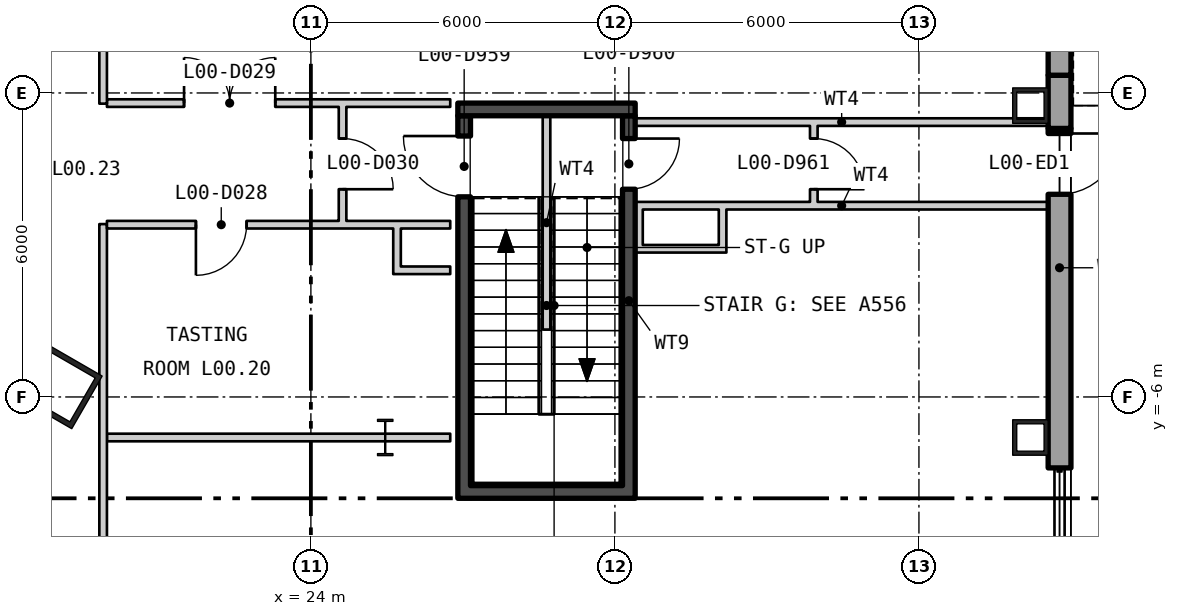
"""IFC4 building model, lengths in metres.
Left out: names, types, materials, properties, quantities, classifications, styles, units other than length and angle.
Written with IfcOpenShell. Run it as: python <this file> out.ifc"""

import sys

from ifc_helpers import new_model, si_unit, direction, frame, frame_2d, origin, origin_2d, place, context, subcontext, project, spatial, polyline, rectangle, hollow_rectangle, i_section, outline, extrude, element, fill, save


model = new_model("IFC4")
c1 = context("Model", 3, precision=1e-05, world=origin(), true_north=direction((0.0, 1.0)))
c2 = subcontext(c1, "Body", "Model", "MODEL_VIEW")
j1 = project(units=[si_unit("LENGTHUNIT", "METRE"), si_unit("PLANEANGLEUNIT", "RADIAN")], contexts=[c1])
p1 = place(None, origin())
s1 = spatial("IfcSite", under=j1, at=p1, CompositionType="ELEMENT")
p2 = place(p1, origin())
s2 = spatial("IfcBuilding", under=s1, at=p2, CompositionType="ELEMENT")
p3 = place(p2, origin())
s3 = spatial("IfcBuildingStorey", under=s2, at=p3, CompositionType="ELEMENT", Elevation=0.0)
p4 = place(p3, frame((19.061, -5.807, 0.0), z_axis=(0.0, 0.0, 1.0), x_axis=(0.5, 0.866025403784, 0.0)))
e1 = element("IfcColumn", 1, at=p4, inside=s3, PredefinedType="COLUMN", context=c2, shape_type="SweptSolid", body=[
    extrude(hollow_rectangle(XDim=1.2, YDim=1.2, WallThickness=0.1, at=origin_2d()), origin(), (0.0, 0.0, 1.0), 8.4),
])
for number, where, z_axis, x_axis in (
    (2, (38.2, -6.8, 0.0), (0.0, 0.0, 1.0), (0.0, 1.0, 0.0)),
    (3, (38.2, -0.25, 0.0), (0.0, 0.0, 1.0), (0.0, 1.0, 0.0)),
):
    element("IfcColumn", number, at=place(p3, frame(where, z_axis=z_axis, x_axis=x_axis)), inside=s3, PredefinedType="COLUMN", context=c2, shape_type="SweptSolid", body=[
        extrude(hollow_rectangle(XDim=0.7, YDim=0.7, WallThickness=0.08, at=origin_2d()), origin(), (0.0, 0.0, 1.0), 8.4),
    ])
p5 = place(p3, frame((25.467, -6.8, 0.0), z_axis=(0.0, 0.0, 1.0), x_axis=(1.0, 0.0, 0.0)))
e4 = element("IfcColumn", 4, at=p5, inside=s3, PredefinedType="COLUMN", context=c2, shape_type="SweptSolid", body=[
    extrude(i_section(OverallWidth=0.304, OverallDepth=0.716, WebThickness=0.021, FlangeThickness=0.04, at=origin_2d()), origin(), (0.0, 0.0, 1.0), 8.4),
])
p6 = place(p3, frame((38.775, -33.575, 5.4), z_axis=(0.0, 0.0, 1.0), x_axis=(0.0, 1.0, 0.0)))
e5 = element("IfcWall", 5, at=p6, inside=s3, PredefinedType="SOLIDWALL", context=c2, shape_type="SweptSolid", body=[
    extrude(outline(polyline([(-0.225, -0.225), (53.775, -0.225), (53.325, 0.225), (0.225, 0.225), (-0.225, -0.225)])), origin(), (0.0, 0.0, 1.0), 2.6),
])
p7 = place(p3, frame((38.775, -7.4, -0.4), z_axis=(0.0, 0.0, 1.0), x_axis=(0.0, 1.0, 0.0)))
e6 = element("IfcWall", 6, at=p7, inside=s3, PredefinedType="SOLIDWALL", context=c2, shape_type="SweptSolid", body=[
    extrude(outline(polyline([(0.0, -0.225), (1.2, -0.225), (1.2, 0.225), (0.0, 0.225), (0.0, -0.225)])), origin(), (0.0, 0.0, 1.0), 5.8),
])
p8 = place(p3, frame((38.775, -0.7, -0.4), z_axis=(0.0, 0.0, 1.0), x_axis=(0.0, 1.0, 0.0)))
e7 = element("IfcWall", 7, at=p8, inside=s3, PredefinedType="SOLIDWALL", context=c2, shape_type="SweptSolid", body=[
    extrude(outline(polyline([(0.0, -0.225), (1.05, -0.225), (1.05, 0.225), (0.0, 0.225), (0.0, -0.225)])), origin(), (0.0, 0.0, 1.0), 5.51),
])
p9 = place(p3, frame((38.775, -12.75, -0.4), z_axis=(0.0, 0.0, 1.0), x_axis=(0.0, 1.0, 0.0)))
e8 = element("IfcWall", 8, at=p9, inside=s3, PredefinedType="SOLIDWALL", context=c2, shape_type="SweptSolid", body=[
    extrude(outline(polyline([(0.0, -0.225), (5.35, -0.225), (5.35, 0.225), (0.0, 0.225), (0.0, -0.225)])), origin(), (0.0, 0.0, 1.0), 1.0),
])
p10 = place(p3, frame((38.775, -6.2, -0.4), z_axis=(0.0, 0.0, 1.0), x_axis=(0.0, 1.0, 0.0)))
e9 = element("IfcWall", 9, at=p10, inside=s3, PredefinedType="SOLIDWALL", context=c2, shape_type="SweptSolid", body=[
    extrude(outline(polyline([(0.0, -0.225), (5.5, -0.225), (5.5, 0.225), (0.0, 0.225), (0.0, -0.225)])), origin(), (0.0, 0.0, 1.0), 5.8),
])
p11 = place(p10, frame((4.2, 0.0, 0.4)))
e10 = element("IfcOpeningElement", 10, at=p11, cuts=e9, PredefinedType="OPENING", context=c2, shape_type="SweptSolid", body=[
    extrude(rectangle(XDim=1.2, YDim=2.4, at=frame_2d((0.6, 1.2))), frame((0.0, 0.235, 0.0), z_axis=(0.0, -1.0, 0.0), x_axis=(1.0, 0.0, 0.0)), (0.0, 0.0, 1.0), 0.47),
])
p12 = place(p3, frame((38.775, 0.35, -0.4), z_axis=(0.0, 0.0, 1.0), x_axis=(0.0, 1.0, 0.0)))
e11 = element("IfcWall", 11, at=p12, inside=s3, PredefinedType="SOLIDWALL", context=c2, shape_type="SweptSolid", body=[
    extrude(outline(polyline([(0.0, -0.225), (5.35, -0.225), (5.35, 0.225), (0.0, 0.225), (0.0, -0.225)])), origin(), (0.0, 0.0, 1.0), 5.8),
])
p13 = place(p12, frame((0.965, 0.0, 0.4)))
e12 = element("IfcOpeningElement", 12, at=p13, cuts=e11, PredefinedType="OPENING", context=c2, shape_type="SweptSolid", body=[
    extrude(rectangle(XDim=1.65, YDim=3.0, at=frame_2d((0.825, 1.5))), frame((0.0, 0.235, 0.0), z_axis=(0.0, -1.0, 0.0), x_axis=(1.0, 0.0, 0.0)), (0.0, 0.0, 1.0), 0.47),
])
p14 = place(p12, frame((2.735, 0.0, 0.4)))
e13 = element("IfcOpeningElement", 13, at=p14, cuts=e11, PredefinedType="OPENING", context=c2, shape_type="SweptSolid", body=[
    extrude(rectangle(XDim=1.65, YDim=3.0, at=frame_2d((0.825, 1.5))), frame((0.0, 0.235, 0.0), z_axis=(0.0, -1.0, 0.0), x_axis=(1.0, 0.0, 0.0)), (0.0, 0.0, 1.0), 0.47),
])
p15 = place(p3, frame((27.025, -7.75, 0.0), z_axis=(0.0, 0.0, 1.0), x_axis=(0.0, 1.0, 0.0)))
e14 = element("IfcWall", 14, at=p15, inside=s3, PredefinedType="SHEAR", context=c2, shape_type="SweptSolid", body=[
    extrude(rectangle(XDim=7.3, YDim=0.25, at=frame_2d((3.65, 0.0))), origin(), (0.0, 0.0, 1.0), 8.18),
])
p16 = place(p15, frame((5.7, 0.0, 0.0)))
e15 = element("IfcOpeningElement", 15, at=p16, cuts=e14, PredefinedType="OPENING", context=c2, shape_type="SweptSolid", body=[
    extrude(rectangle(XDim=1.2, YDim=2.1, at=frame_2d((0.6, 1.05))), frame((0.0, 0.135, 0.0), z_axis=(0.0, -1.0, 0.0), x_axis=(1.0, 0.0, 0.0)), (0.0, 0.0, 1.0), 0.27),
])
p17 = place(p3, frame((30.275, -7.75, 0.0), z_axis=(0.0, 0.0, 1.0), x_axis=(0.0, 1.0, 0.0)))
e16 = element("IfcWall", 16, at=p17, inside=s3, PredefinedType="SHEAR", context=c2, shape_type="SweptSolid", body=[
    extrude(rectangle(XDim=7.3, YDim=0.25, at=frame_2d((3.65, 0.0))), origin(), (0.0, 0.0, 1.0), 8.18),
])
p18 = place(p17, frame((5.85, 0.0, 0.0)))
e17 = element("IfcOpeningElement", 17, at=p18, cuts=e16, PredefinedType="OPENING", context=c2, shape_type="SweptSolid", body=[
    extrude(rectangle(XDim=1.0, YDim=2.1, at=frame_2d((0.5, 1.05))), frame((0.0, 0.135, 0.0), z_axis=(0.0, -1.0, 0.0), x_axis=(1.0, 0.0, 0.0)), (0.0, 0.0, 1.0), 0.27),
])
for number, where, z_axis, x_axis in (
    (18, (26.9, -7.875, 0.0), (0.0, 0.0, 1.0), (1.0, 0.0, 0.0)),
    (19, (26.9, -0.325, 0.0), (0.0, 0.0, 1.0), (1.0, 0.0, 0.0)),
):
    element("IfcWall", number, at=place(p3, frame(where, z_axis=z_axis, x_axis=x_axis)), inside=s3, PredefinedType="SHEAR", context=c2, shape_type="SweptSolid", body=[
        extrude(rectangle(XDim=3.5, YDim=0.25, at=frame_2d((1.75, 0.0))), origin(), (0.0, 0.0, 1.0), 8.18),
    ])
p19 = place(p3, frame((28.65, -4.67, 0.0), z_axis=(0.0, 0.0, 1.0), x_axis=(0.0, 1.0, 0.0)))
e20 = element("IfcWall", 20, at=p19, inside=s3, PredefinedType="PARTITIONING", context=c2, shape_type="SweptSolid", body=[
    extrude(rectangle(XDim=4.22, YDim=0.15, at=frame_2d((2.11, 0.0))), origin(), (0.0, 0.0, 1.0), 4.0),
])
for number, where, z_axis, x_axis in (
    (21, (38.55, -2.225, 0.0), (0.0, 0.0, 1.0), (-1.0, 0.0, 0.0)),
    (22, (38.55, -0.575, 0.0), (0.0, 0.0, 1.0), (-1.0, 0.0, 0.0)),
):
    element("IfcWall", number, at=place(p3, frame(where, z_axis=z_axis, x_axis=x_axis)), inside=s3, PredefinedType="PARTITIONING", context=c2, shape_type="SweptSolid", body=[
        extrude(rectangle(XDim=8.15, YDim=0.15, at=frame_2d((4.075, 0.0))), origin(), (0.0, 0.0, 1.0), 8.18),
    ])
p20 = place(p3, frame((33.925, -2.15, 0.0), z_axis=(0.0, 0.0, 1.0), x_axis=(0.0, 1.0, 0.0)))
e23 = element("IfcWall", 23, at=p20, inside=s3, PredefinedType="PARTITIONING", context=c2, shape_type="SweptSolid", body=[
    extrude(rectangle(XDim=1.5, YDim=0.15, at=frame_2d((0.75, 0.0))), origin(), (0.0, 0.0, 1.0), 8.18),
])
p21 = place(p20, frame((0.25, 0.0, 0.0)))
e24 = element("IfcOpeningElement", 24, at=p21, cuts=e23, PredefinedType="OPENING", context=c2, shape_type="SweptSolid", body=[
    extrude(rectangle(XDim=1.0, YDim=2.1, at=frame_2d((0.5, 1.05))), frame((0.0, 0.085, 0.0), z_axis=(0.0, -1.0, 0.0), x_axis=(1.0, 0.0, 0.0)), (0.0, 0.0, 1.0), 0.17),
])
p22 = place(p3, frame((30.4, -3.075, 0.0), z_axis=(0.0, 0.0, 1.0), x_axis=(1.0, 0.0, 0.0)))
e25 = element("IfcWall", 25, at=p22, inside=s3, PredefinedType="PARTITIONING", context=c2, shape_type="SweptSolid", body=[
    extrude(rectangle(XDim=1.8, YDim=0.15, at=frame_2d((0.9, 0.0))), origin(), (0.0, 0.0, 1.0), 8.18),
])
for number, where, z_axis, x_axis in (
    (26, (30.475, -3.0, 0.0), (0.0, 0.0, 1.0), (0.0, 1.0, 0.0)),
    (27, (32.125, -3.0, 0.0), (0.0, 0.0, 1.0), (0.0, 1.0, 0.0)),
):
    element("IfcWall", number, at=place(p3, frame(where, z_axis=z_axis, x_axis=x_axis)), inside=s3, PredefinedType="PARTITIONING", context=c2, shape_type="SweptSolid", body=[
        extrude(rectangle(XDim=0.7, YDim=0.15, at=frame_2d((0.35, 0.0))), origin(), (0.0, 0.0, 1.0), 8.18),
    ])
p23 = place(p3, frame((19.9, -23.6, 0.0), z_axis=(0.0, 0.0, 1.0), x_axis=(0.0, 1.0, 0.0)))
e28 = element("IfcWall", 28, at=p23, inside=s3, PredefinedType="PARTITIONING", context=c2, shape_type="SweptSolid", body=[
    extrude(rectangle(XDim=21.012, YDim=0.15, at=frame_2d((10.506, 0.0))), origin(), (0.0, 0.0, 1.0), 8.18),
])
p24 = place(p23, frame((2.518, 0.0, 0.0)))
e29 = element("IfcOpeningElement", 29, at=p24, cuts=e28, PredefinedType="OPENING", context=c2, shape_type="SweptSolid", body=[
    extrude(rectangle(XDim=1.8, YDim=2.1, at=frame_2d((0.9, 1.05))), frame((0.0, 0.085, 0.0), z_axis=(0.0, -1.0, 0.0), x_axis=(1.0, 0.0, 0.0)), (0.0, 0.0, 1.0), 0.17),
])
p25 = place(p23, frame((11.823, 0.0, 0.0)))
e30 = element("IfcOpeningElement", 30, at=p25, cuts=e28, PredefinedType="OPENING", context=c2, shape_type="SweptSolid", body=[
    extrude(rectangle(XDim=1.8, YDim=2.1, at=frame_2d((0.9, 1.05))), frame((0.0, 0.085, 0.0), z_axis=(0.0, -1.0, 0.0), x_axis=(1.0, 0.0, 0.0)), (0.0, 0.0, 1.0), 0.17),
])
p26 = place(p3, frame((19.9, -0.211, 0.0), z_axis=(0.0, 0.0, 1.0), x_axis=(0.0, 1.0, 0.0)))
e31 = element("IfcWall", 31, at=p26, inside=s3, PredefinedType="PARTITIONING", context=c2, shape_type="SweptSolid", body=[
    extrude(rectangle(XDim=20.171, YDim=0.15, at=frame_2d((10.085, 0.0))), origin(), (0.0, 0.0, 1.0), 8.18),
])
p27 = place(p26, frame((9.711, 0.0, 0.0)))
e32 = element("IfcOpeningElement", 32, at=p27, cuts=e31, PredefinedType="OPENING", context=c2, shape_type="SweptSolid", body=[
    extrude(rectangle(XDim=1.0, YDim=2.1, at=frame_2d((0.5, 1.05))), frame((0.0, 0.085, 0.0), z_axis=(0.0, -1.0, 0.0), x_axis=(1.0, 0.0, 0.0)), (0.0, 0.0, 1.0), 0.17),
])
p28 = place(p3, frame((19.975, -6.8, 0.0), z_axis=(0.0, 0.0, 1.0), x_axis=(1.0, 0.0, 0.0)))
e33 = element("IfcWall", 33, at=p28, inside=s3, PredefinedType="PARTITIONING", context=c2, shape_type="SweptSolid", body=[
    extrude(rectangle(XDim=6.775, YDim=0.15, at=frame_2d((3.388, 0.0))), origin(), (0.0, 0.0, 1.0), 7.39),
])
p29 = place(p3, frame((19.975, -2.6, 0.0), z_axis=(0.0, 0.0, 1.0), x_axis=(1.0, 0.0, 0.0)))
e34 = element("IfcWall", 34, at=p29, inside=s3, PredefinedType="PARTITIONING", context=c2, shape_type="SweptSolid", body=[
    extrude(rectangle(XDim=5.713, YDim=0.15, at=frame_2d((2.857, 0.0))), origin(), (0.0, 0.0, 1.0), 8.18),
])
p30 = place(p29, frame((1.756, 0.0, 0.0)))
e35 = element("IfcOpeningElement", 35, at=p30, cuts=e34, PredefinedType="OPENING", context=c2, shape_type="SweptSolid", body=[
    extrude(rectangle(XDim=1.0, YDim=2.1, at=frame_2d((0.5, 1.05))), frame((0.0, 0.085, 0.0), z_axis=(0.0, -1.0, 0.0), x_axis=(1.0, 0.0, 0.0)), (0.0, 0.0, 1.0), 0.17),
])
p31 = place(p3, frame((19.975, -0.2, 0.0), z_axis=(0.0, 0.0, 1.0), x_axis=(1.0, 0.0, 0.0)))
e36 = element("IfcWall", 36, at=p31, inside=s3, PredefinedType="PARTITIONING", context=c2, shape_type="SweptSolid", body=[
    extrude(rectangle(XDim=6.775, YDim=0.15, at=frame_2d((3.388, 0.0))), origin(), (0.0, 0.0, 1.0), 8.18),
])
p32 = place(p31, frame((1.522, 0.0, 0.0)))
e37 = element("IfcOpeningElement", 37, at=p32, cuts=e36, PredefinedType="OPENING", context=c2, shape_type="SweptSolid", body=[
    extrude(rectangle(XDim=1.8, YDim=2.1, at=frame_2d((0.9, 1.05))), frame((0.0, 0.085, 0.0), z_axis=(0.0, -1.0, 0.0), x_axis=(1.0, 0.0, 0.0)), (0.0, 0.0, 1.0), 0.17),
])
p33 = place(p3, frame((24.625, -2.525, 0.0), z_axis=(0.0, 0.0, 1.0), x_axis=(0.0, 1.0, 0.0)))
e38 = element("IfcWall", 38, at=p33, inside=s3, PredefinedType="PARTITIONING", context=c2, shape_type="SweptSolid", body=[
    extrude(rectangle(XDim=2.25, YDim=0.15, at=frame_2d((1.125, 0.0))), origin(), (0.0, 0.0, 1.0), 8.18),
])
p34 = place(p33, frame((0.625, 0.0, 0.0)))
e39 = element("IfcOpeningElement", 39, at=p34, cuts=e38, PredefinedType="OPENING", context=c2, shape_type="SweptSolid", body=[
    extrude(rectangle(XDim=1.0, YDim=2.1, at=frame_2d((0.5, 1.05))), frame((0.0, 0.085, 0.0), z_axis=(0.0, -1.0, 0.0), x_axis=(1.0, 0.0, 0.0)), (0.0, 0.0, 1.0), 0.17),
])
p35 = place(p3, frame((25.625, -3.5, 0.0), z_axis=(0.0, 0.0, 1.0), x_axis=(1.0, 0.0, 0.0)))
e40 = element("IfcWall", 40, at=p35, inside=s3, PredefinedType="PARTITIONING", context=c2, shape_type="SweptSolid", body=[
    extrude(rectangle(XDim=1.125, YDim=0.15, at=frame_2d((0.562, 0.0))), origin(), (0.0, 0.0, 1.0), 8.18),
])
p36 = place(p3, frame((25.688, -2.6, 0.0), z_axis=(0.0, 0.0, 1.0), x_axis=(1.0, 0.0, 0.0)))
e41 = element("IfcWall", 41, at=p36, inside=s3, PredefinedType="PARTITIONING", context=c2, shape_type="SweptSolid", body=[
    extrude(rectangle(XDim=1.062, YDim=0.15, at=frame_2d((0.531, 0.0))), origin(), (0.0, 0.0, 1.0), 8.18),
])
p37 = place(p3, frame((25.7, -3.425, 0.0), z_axis=(0.0, 0.0, 1.0), x_axis=(0.0, 1.0, 0.0)))
e42 = element("IfcWall", 42, at=p37, inside=s3, PredefinedType="PARTITIONING", context=c2, shape_type="SweptSolid", body=[
    extrude(rectangle(XDim=0.75, YDim=0.15, at=frame_2d((0.375, 0.0))), origin(), (0.0, 0.0, 1.0), 8.18),
])
p38 = place(p11, frame((1.2, 0.0, 0.0), z_axis=(0.0, 0.0, 1.0), x_axis=(-1.0, 0.0, 0.0)))
e43 = element("IfcDoor", 43, at=p38, inside=s3, OperationType="SINGLE_SWING_RIGHT", PredefinedType="DOOR", context=c2, shape_type="SweptSolid", body=[
    extrude(rectangle(XDim=1.2, YDim=2.4, at=frame_2d((0.6, 1.2))), frame((0.0, 0.025, 0.0), z_axis=(0.0, -1.0, 0.0), x_axis=(1.0, 0.0, 0.0)), (0.0, 0.0, 1.0), 0.05),
])
fill(e10, e43)
p39 = place(p16, origin())
e44 = element("IfcDoor", 44, at=p39, inside=s3, OperationType="SINGLE_SWING_LEFT", PredefinedType="DOOR", context=c2, shape_type="SweptSolid", body=[
    extrude(rectangle(XDim=1.2, YDim=2.1, at=frame_2d((0.6, 1.05))), frame((0.0, 0.025, 0.0), z_axis=(0.0, -1.0, 0.0), x_axis=(1.0, 0.0, 0.0)), (0.0, 0.0, 1.0), 0.05),
])
fill(e15, e44)
p40 = place(p18, origin())
e45 = element("IfcDoor", 45, at=p40, inside=s3, OperationType="SINGLE_SWING_RIGHT", PredefinedType="DOOR", context=c2, shape_type="SweptSolid", body=[
    extrude(rectangle(XDim=1.0, YDim=2.1, at=frame_2d((0.5, 1.05))), frame((0.0, 0.025, 0.0), z_axis=(0.0, -1.0, 0.0), x_axis=(1.0, 0.0, 0.0)), (0.0, 0.0, 1.0), 0.05),
])
fill(e17, e45)
p41 = place(p21, origin())
e46 = element("IfcDoor", 46, at=p41, inside=s3, OperationType="SINGLE_SWING_LEFT", PredefinedType="DOOR", context=c2, shape_type="SweptSolid", body=[
    extrude(rectangle(XDim=1.0, YDim=2.1, at=frame_2d((0.5, 1.05))), frame((0.0, 0.025, 0.0), z_axis=(0.0, -1.0, 0.0), x_axis=(1.0, 0.0, 0.0)), (0.0, 0.0, 1.0), 0.05),
])
fill(e24, e46)
p42 = place(p30, origin())
e47 = element("IfcDoor", 47, at=p42, inside=s3, OperationType="SINGLE_SWING_LEFT", PredefinedType="DOOR", context=c2, shape_type="SweptSolid", body=[
    extrude(rectangle(XDim=1.0, YDim=2.1, at=frame_2d((0.5, 1.05))), frame((0.0, 0.025, 0.0), z_axis=(0.0, -1.0, 0.0), x_axis=(1.0, 0.0, 0.0)), (0.0, 0.0, 1.0), 0.05),
])
fill(e35, e47)
p43 = place(p32, origin())
e48 = element("IfcDoor", 48, at=p43, inside=s3, OperationType="DOUBLE_DOOR_SINGLE_SWING", PredefinedType="DOOR", context=c2, shape_type="SweptSolid", body=[
    extrude(rectangle(XDim=1.8, YDim=2.1, at=frame_2d((0.9, 1.05))), frame((0.0, 0.025, 0.0), z_axis=(0.0, -1.0, 0.0), x_axis=(1.0, 0.0, 0.0)), (0.0, 0.0, 1.0), 0.05),
])
fill(e37, e48)
p44 = place(p34, origin())
e49 = element("IfcDoor", 49, at=p44, inside=s3, OperationType="SINGLE_SWING_LEFT", PredefinedType="DOOR", context=c2, shape_type="SweptSolid", body=[
    extrude(rectangle(XDim=1.0, YDim=2.1, at=frame_2d((0.5, 1.05))), frame((0.0, 0.025, 0.0), z_axis=(0.0, -1.0, 0.0), x_axis=(1.0, 0.0, 0.0)), (0.0, 0.0, 1.0), 0.05),
])
fill(e39, e49)
save(model, sys.argv[1])
